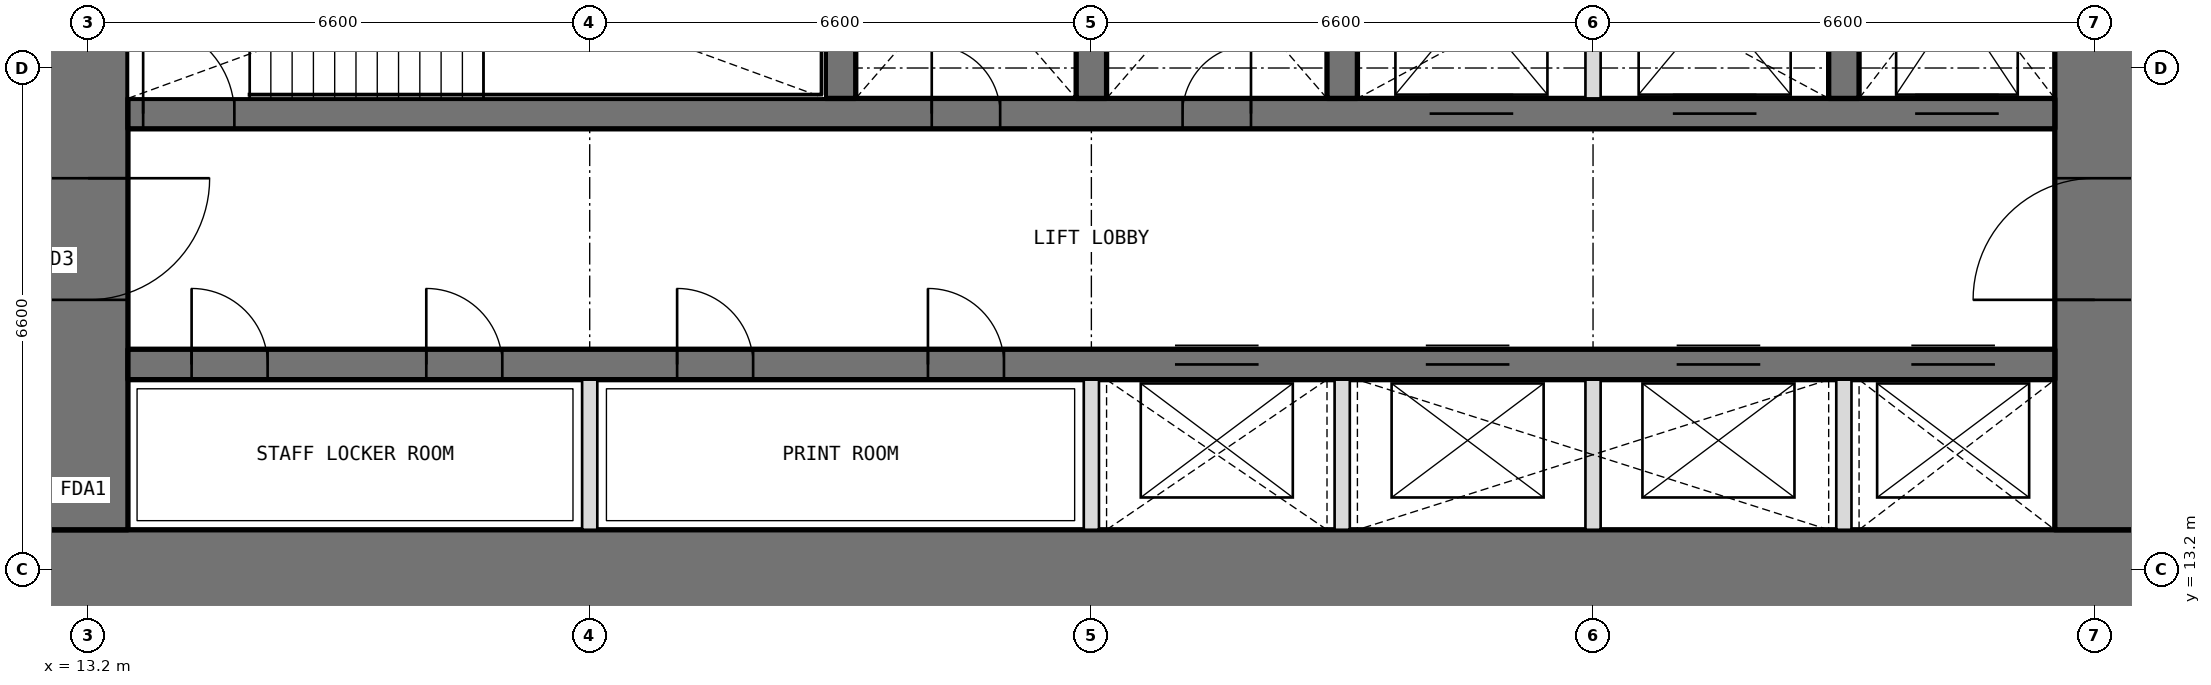
"""IFC4 building model, lengths in metres.
Left out: names, types, materials, properties, quantities, classifications, styles, units other than length and angle.
Written with IfcOpenShell. Run it as: python <this file> out.ifc"""

import sys

from ifc_helpers import new_model, si_unit, direction, frame, frame_2d, origin, place, context, subcontext, project, spatial, rectangle, extrude, element, fill, save


model = new_model("IFC4")
c1 = context("Model", 3, precision=1e-05, world=origin(), true_north=direction((0.0, 1.0)))
c2 = subcontext(c1, "Body", "Model", "MODEL_VIEW")
j1 = project(units=[si_unit("LENGTHUNIT", "METRE"), si_unit("PLANEANGLEUNIT", "RADIAN")], contexts=[c1])
p1 = place(None, origin())
s1 = spatial("IfcSite", under=j1, at=p1, CompositionType="ELEMENT")
p2 = place(p1, origin())
s2 = spatial("IfcBuilding", under=s1, at=p2, CompositionType="ELEMENT")
p3 = place(p2, frame((0.0, 0.0, 111.6)))
s3 = spatial("IfcBuildingStorey", under=s2, at=p3, CompositionType="ELEMENT", Elevation=111.6)
p4 = place(p3, frame((12.675, 13.2, 0.0), z_axis=(0.0, 0.0, 1.0), x_axis=(1.0, 0.0, 0.0)))
e1 = element("IfcWall", 1, at=p4, inside=s3, PredefinedType="SHEAR", context=c2, shape_type="SweptSolid", body=[
    extrude(rectangle(XDim=27.45, YDim=1.05, at=frame_2d((13.725, 0.0))), origin(), (0.0, 0.0, 1.0), 4.2),
])
p5 = place(p3, frame((39.6, 13.725, 0.0), z_axis=(0.0, 0.0, 1.0), x_axis=(0.0, 1.0, 0.0)))
e2 = element("IfcWall", 2, at=p5, inside=s3, PredefinedType="SHEAR", context=c2, shape_type="SweptSolid", body=[
    extrude(rectangle(XDim=18.75, YDim=1.05, at=frame_2d((9.375, 0.0))), origin(), (0.0, 0.0, 1.0), 4.2),
])
p6 = place(p5, frame((3.025, 0.0, 0.0)))
e3 = element("IfcOpeningElement", 3, at=p6, cuts=e2, PredefinedType="OPENING", context=c2, shape_type="SweptSolid", body=[
    extrude(rectangle(XDim=1.6, YDim=2.1, at=frame_2d((0.8, 1.05))), frame((0.0, 0.535, 0.0), z_axis=(0.0, -1.0, 0.0), x_axis=(1.0, 0.0, 0.0)), (0.0, 0.0, 1.0), 1.07),
])
p7 = place(p5, frame((13.825, 0.0, 0.0)))
e4 = element("IfcOpeningElement", 4, at=p7, cuts=e2, PredefinedType="OPENING", context=c2, shape_type="SweptSolid", body=[
    extrude(rectangle(XDim=1.6, YDim=2.1, at=frame_2d((0.8, 1.05))), frame((0.0, 0.535, 0.0), z_axis=(0.0, -1.0, 0.0), x_axis=(1.0, 0.0, 0.0)), (0.0, 0.0, 1.0), 1.07),
])
p8 = place(p3, frame((13.2, 32.475, 0.0), z_axis=(0.0, 0.0, 1.0), x_axis=(0.0, -1.0, 0.0)))
e5 = element("IfcWall", 5, at=p8, inside=s3, PredefinedType="SHEAR", context=c2, shape_type="SweptSolid", body=[
    extrude(rectangle(XDim=18.75, YDim=1.05, at=frame_2d((9.375, 0.0))), origin(), (0.0, 0.0, 1.0), 4.2),
])
p9 = place(p8, frame((14.125, 0.0, 0.0)))
e6 = element("IfcOpeningElement", 6, at=p9, cuts=e5, PredefinedType="OPENING", context=c2, shape_type="SweptSolid", body=[
    extrude(rectangle(XDim=1.6, YDim=2.1, at=frame_2d((0.8, 1.05))), frame((0.0, 0.535, 0.0), z_axis=(0.0, -1.0, 0.0), x_axis=(1.0, 0.0, 0.0)), (0.0, 0.0, 1.0), 1.07),
])
p10 = place(p8, frame((3.325, 0.0, 0.0)))
e7 = element("IfcOpeningElement", 7, at=p10, cuts=e5, PredefinedType="OPENING", context=c2, shape_type="SweptSolid", body=[
    extrude(rectangle(XDim=1.6, YDim=2.1, at=frame_2d((0.8, 1.05))), frame((0.0, 0.535, 0.0), z_axis=(0.0, -1.0, 0.0), x_axis=(1.0, 0.0, 0.0)), (0.0, 0.0, 1.0), 1.07),
])
p11 = place(p3, frame((13.725, 15.9, 0.0), z_axis=(0.0, 0.0, 1.0), x_axis=(1.0, 0.0, 0.0)))
e8 = element("IfcWall", 8, at=p11, inside=s3, PredefinedType="SHEAR", context=c2, shape_type="SweptSolid", body=[
    extrude(rectangle(XDim=25.35, YDim=0.4, at=frame_2d((12.675, 0.0))), origin(), (0.0, 0.0, 1.0), 4.2),
])
p12 = place(p11, frame((0.837, 0.0, 0.0)))
e9 = element("IfcOpeningElement", 9, at=p12, cuts=e8, PredefinedType="OPENING", context=c2, shape_type="SweptSolid", body=[
    extrude(rectangle(XDim=1.0, YDim=2.1, at=frame_2d((0.5, 1.05))), frame((0.0, 0.21, 0.0), z_axis=(0.0, -1.0, 0.0), x_axis=(1.0, 0.0, 0.0)), (0.0, 0.0, 1.0), 0.42),
])
p13 = place(p11, frame((3.925, 0.0, 0.0)))
e10 = element("IfcOpeningElement", 10, at=p13, cuts=e8, PredefinedType="OPENING", context=c2, shape_type="SweptSolid", body=[
    extrude(rectangle(XDim=1.0, YDim=2.1, at=frame_2d((0.5, 1.05))), frame((0.0, 0.21, 0.0), z_axis=(0.0, -1.0, 0.0), x_axis=(1.0, 0.0, 0.0)), (0.0, 0.0, 1.0), 0.42),
])
p14 = place(p11, frame((7.225, 0.0, 0.0)))
e11 = element("IfcOpeningElement", 11, at=p14, cuts=e8, PredefinedType="OPENING", context=c2, shape_type="SweptSolid", body=[
    extrude(rectangle(XDim=1.0, YDim=2.1, at=frame_2d((0.5, 1.05))), frame((0.0, 0.21, 0.0), z_axis=(0.0, -1.0, 0.0), x_axis=(1.0, 0.0, 0.0)), (0.0, 0.0, 1.0), 0.42),
])
p15 = place(p11, frame((10.525, 0.0, 0.0)))
e12 = element("IfcOpeningElement", 12, at=p15, cuts=e8, PredefinedType="OPENING", context=c2, shape_type="SweptSolid", body=[
    extrude(rectangle(XDim=1.0, YDim=2.1, at=frame_2d((0.5, 1.05))), frame((0.0, 0.21, 0.0), z_axis=(0.0, -1.0, 0.0), x_axis=(1.0, 0.0, 0.0)), (0.0, 0.0, 1.0), 0.42),
])
p16 = place(p11, frame((13.775, 0.0, 0.0)))
e13 = element("IfcOpeningElement", 13, at=p16, cuts=e8, PredefinedType="OPENING", context=c2, shape_type="SweptSolid", body=[
    extrude(rectangle(XDim=1.1, YDim=2.1, at=frame_2d((0.55, 1.05))), frame((0.0, 0.21, 0.0), z_axis=(0.0, -1.0, 0.0), x_axis=(1.0, 0.0, 0.0)), (0.0, 0.0, 1.0), 0.42),
])
p17 = place(p11, frame((17.075, 0.0, 0.0)))
e14 = element("IfcOpeningElement", 14, at=p17, cuts=e8, PredefinedType="OPENING", context=c2, shape_type="SweptSolid", body=[
    extrude(rectangle(XDim=1.1, YDim=2.1, at=frame_2d((0.55, 1.05))), frame((0.0, 0.21, 0.0), z_axis=(0.0, -1.0, 0.0), x_axis=(1.0, 0.0, 0.0)), (0.0, 0.0, 1.0), 0.42),
])
p18 = place(p11, frame((20.375, 0.0, 0.0)))
e15 = element("IfcOpeningElement", 15, at=p18, cuts=e8, PredefinedType="OPENING", context=c2, shape_type="SweptSolid", body=[
    extrude(rectangle(XDim=1.1, YDim=2.1, at=frame_2d((0.55, 1.05))), frame((0.0, 0.21, 0.0), z_axis=(0.0, -1.0, 0.0), x_axis=(1.0, 0.0, 0.0)), (0.0, 0.0, 1.0), 0.42),
])
p19 = place(p11, frame((23.462, 0.0, 0.0)))
e16 = element("IfcOpeningElement", 16, at=p19, cuts=e8, PredefinedType="OPENING", context=c2, shape_type="SweptSolid", body=[
    extrude(rectangle(XDim=1.1, YDim=2.1, at=frame_2d((0.55, 1.05))), frame((0.0, 0.21, 0.0), z_axis=(0.0, -1.0, 0.0), x_axis=(1.0, 0.0, 0.0)), (0.0, 0.0, 1.0), 0.42),
])
p20 = place(p3, frame((13.725, 19.2, 0.0), z_axis=(0.0, 0.0, 1.0), x_axis=(1.0, 0.0, 0.0)))
e17 = element("IfcWall", 17, at=p20, inside=s3, PredefinedType="SHEAR", context=c2, shape_type="SweptSolid", body=[
    extrude(rectangle(XDim=25.35, YDim=0.4, at=frame_2d((12.675, 0.0))), origin(), (0.0, 0.0, 1.0), 4.2),
])
p21 = place(p20, frame((10.575, 0.0, 0.0)))
e18 = element("IfcOpeningElement", 18, at=p21, cuts=e17, PredefinedType="OPENING", context=c2, shape_type="SweptSolid", body=[
    extrude(rectangle(XDim=0.9, YDim=2.1, at=frame_2d((0.45, 1.05))), frame((0.0, 0.21, 0.0), z_axis=(0.0, -1.0, 0.0), x_axis=(1.0, 0.0, 0.0)), (0.0, 0.0, 1.0), 0.42),
])
p22 = place(p20, frame((13.875, 0.0, 0.0)))
e19 = element("IfcOpeningElement", 19, at=p22, cuts=e17, PredefinedType="OPENING", context=c2, shape_type="SweptSolid", body=[
    extrude(rectangle(XDim=0.9, YDim=2.1, at=frame_2d((0.45, 1.05))), frame((0.0, 0.21, 0.0), z_axis=(0.0, -1.0, 0.0), x_axis=(1.0, 0.0, 0.0)), (0.0, 0.0, 1.0), 0.42),
])
p23 = place(p20, frame((0.2, 0.0, 0.0)))
e20 = element("IfcOpeningElement", 20, at=p23, cuts=e17, PredefinedType="OPENING", context=c2, shape_type="SweptSolid", body=[
    extrude(rectangle(XDim=1.2, YDim=2.1, at=frame_2d((0.6, 1.05))), frame((0.0, 0.21, 0.0), z_axis=(0.0, -1.0, 0.0), x_axis=(1.0, 0.0, 0.0)), (0.0, 0.0, 1.0), 0.42),
])
p24 = place(p20, frame((23.512, 0.0, 0.0)))
e21 = element("IfcOpeningElement", 21, at=p24, cuts=e17, PredefinedType="OPENING", context=c2, shape_type="SweptSolid", body=[
    extrude(rectangle(XDim=1.1, YDim=2.1, at=frame_2d((0.55, 1.05))), frame((0.0, 0.21, 0.0), z_axis=(0.0, -1.0, 0.0), x_axis=(1.0, 0.0, 0.0)), (0.0, 0.0, 1.0), 0.42),
])
p25 = place(p20, frame((17.125, 0.0, 0.0)))
e22 = element("IfcOpeningElement", 22, at=p25, cuts=e17, PredefinedType="OPENING", context=c2, shape_type="SweptSolid", body=[
    extrude(rectangle(XDim=1.1, YDim=2.1, at=frame_2d((0.55, 1.05))), frame((0.0, 0.21, 0.0), z_axis=(0.0, -1.0, 0.0), x_axis=(1.0, 0.0, 0.0)), (0.0, 0.0, 1.0), 0.42),
])
p26 = place(p20, frame((20.325, 0.0, 0.0)))
e23 = element("IfcOpeningElement", 23, at=p26, cuts=e17, PredefinedType="OPENING", context=c2, shape_type="SweptSolid", body=[
    extrude(rectangle(XDim=1.1, YDim=2.1, at=frame_2d((0.55, 1.05))), frame((0.0, 0.21, 0.0), z_axis=(0.0, -1.0, 0.0), x_axis=(1.0, 0.0, 0.0)), (0.0, 0.0, 1.0), 0.42),
])
for number, where, z_axis, x_axis in (
    (24, (23.1, 19.4, 0.0), (0.0, 0.0, 1.0), (0.0, 1.0, 0.0)),
    (25, (26.4, 19.4, 0.0), (0.0, 0.0, 1.0), (0.0, 1.0, 0.0)),
    (26, (29.7, 19.4, 0.0), (0.0, 0.0, 1.0), (0.0, 1.0, 0.0)),
    (27, (36.3, 19.4, 0.0), (0.0, 0.0, 1.0), (0.0, 1.0, 0.0)),
):
    element("IfcWall", number, at=place(p3, frame(where, z_axis=z_axis, x_axis=x_axis)), inside=s3, PredefinedType="SHEAR", context=c2, shape_type="SweptSolid", body=[
        extrude(rectangle(XDim=3.35, YDim=0.4, at=frame_2d((1.675, 0.0))), origin(), (0.0, 0.0, 1.0), 4.2),
    ])
for number, where, z_axis, x_axis in (
    (28, (19.8, 13.725, 0.0), (0.0, 0.0, 1.0), (0.0, 1.0, 0.0)),
    (29, (26.4, 13.725, 0.0), (0.0, 0.0, 1.0), (0.0, 1.0, 0.0)),
    (30, (29.7, 13.725, 0.0), (0.0, 0.0, 1.0), (0.0, 1.0, 0.0)),
    (31, (33.0, 13.725, 0.0), (0.0, 0.0, 1.0), (0.0, 1.0, 0.0)),
    (32, (36.3, 13.725, 0.0), (0.0, 0.0, 1.0), (0.0, 1.0, 0.0)),
):
    element("IfcWall", number, at=place(p3, frame(where, z_axis=z_axis, x_axis=x_axis)), inside=s3, PredefinedType="PARTITIONING", context=c2, shape_type="SweptSolid", body=[
        extrude(rectangle(XDim=1.975, YDim=0.2, at=frame_2d((0.987, 0.0))), origin(), (0.0, 0.0, 1.0), 4.2),
    ])
p27 = place(p3, frame((33.0, 19.4, 0.0), z_axis=(0.0, 0.0, 1.0), x_axis=(0.0, 1.0, 0.0)))
e33 = element("IfcWall", 33, at=p27, inside=s3, PredefinedType="PARTITIONING", context=c2, shape_type="SweptSolid", body=[
    extrude(rectangle(XDim=3.35, YDim=0.2, at=frame_2d((1.675, 0.0))), origin(), (0.0, 0.0, 1.0), 4.2),
])
p28 = place(p21, origin())
e34 = element("IfcDoor", 34, at=p28, inside=s3, OperationType="SINGLE_SWING_LEFT", PredefinedType="DOOR", context=c2, shape_type="SweptSolid", body=[
    extrude(rectangle(XDim=0.9, YDim=2.1, at=frame_2d((0.45, 1.05))), frame((0.0, 0.025, 0.0), z_axis=(0.0, -1.0, 0.0), x_axis=(1.0, 0.0, 0.0)), (0.0, 0.0, 1.0), 0.05),
])
fill(e18, e34)
p29 = place(p22, origin())
e35 = element("IfcDoor", 35, at=p29, inside=s3, OperationType="SINGLE_SWING_RIGHT", PredefinedType="DOOR", context=c2, shape_type="SweptSolid", body=[
    extrude(rectangle(XDim=0.9, YDim=2.1, at=frame_2d((0.45, 1.05))), frame((0.0, 0.025, 0.0), z_axis=(0.0, -1.0, 0.0), x_axis=(1.0, 0.0, 0.0)), (0.0, 0.0, 1.0), 0.05),
])
fill(e19, e35)
p30 = place(p12, origin())
e36 = element("IfcDoor", 36, at=p30, inside=s3, OperationType="SINGLE_SWING_LEFT", PredefinedType="DOOR", context=c2, shape_type="SweptSolid", body=[
    extrude(rectangle(XDim=1.0, YDim=2.1, at=frame_2d((0.5, 1.05))), frame((0.0, 0.025, 0.0), z_axis=(0.0, -1.0, 0.0), x_axis=(1.0, 0.0, 0.0)), (0.0, 0.0, 1.0), 0.05),
])
fill(e9, e36)
p31 = place(p13, origin())
e37 = element("IfcDoor", 37, at=p31, inside=s3, OperationType="SINGLE_SWING_LEFT", PredefinedType="DOOR", context=c2, shape_type="SweptSolid", body=[
    extrude(rectangle(XDim=1.0, YDim=2.1, at=frame_2d((0.5, 1.05))), frame((0.0, 0.025, 0.0), z_axis=(0.0, -1.0, 0.0), x_axis=(1.0, 0.0, 0.0)), (0.0, 0.0, 1.0), 0.05),
])
fill(e10, e37)
p32 = place(p14, origin())
e38 = element("IfcDoor", 38, at=p32, inside=s3, OperationType="SINGLE_SWING_LEFT", PredefinedType="DOOR", context=c2, shape_type="SweptSolid", body=[
    extrude(rectangle(XDim=1.0, YDim=2.1, at=frame_2d((0.5, 1.05))), frame((0.0, 0.025, 0.0), z_axis=(0.0, -1.0, 0.0), x_axis=(1.0, 0.0, 0.0)), (0.0, 0.0, 1.0), 0.05),
])
fill(e11, e38)
p33 = place(p15, origin())
e39 = element("IfcDoor", 39, at=p33, inside=s3, OperationType="SINGLE_SWING_LEFT", PredefinedType="DOOR", context=c2, shape_type="SweptSolid", body=[
    extrude(rectangle(XDim=1.0, YDim=2.1, at=frame_2d((0.5, 1.05))), frame((0.0, 0.025, 0.0), z_axis=(0.0, -1.0, 0.0), x_axis=(1.0, 0.0, 0.0)), (0.0, 0.0, 1.0), 0.05),
])
fill(e12, e39)
p34 = place(p23, origin())
e40 = element("IfcDoor", 40, at=p34, inside=s3, OperationType="SINGLE_SWING_LEFT", PredefinedType="DOOR", context=c2, shape_type="SweptSolid", body=[
    extrude(rectangle(XDim=1.2, YDim=2.1, at=frame_2d((0.6, 1.05))), frame((0.0, 0.025, 0.0), z_axis=(0.0, -1.0, 0.0), x_axis=(1.0, 0.0, 0.0)), (0.0, 0.0, 1.0), 0.05),
])
fill(e20, e40)
p35 = place(p9, origin())
e41 = element("IfcDoor", 41, at=p35, inside=s3, OperationType="DOUBLE_DOOR_DOUBLE_SWING", PredefinedType="DOOR", context=c2, shape_type="SweptSolid", body=[
    extrude(rectangle(XDim=1.6, YDim=2.1, at=frame_2d((0.8, 1.05))), frame((0.0, 0.025, 0.0), z_axis=(0.0, -1.0, 0.0), x_axis=(1.0, 0.0, 0.0)), (0.0, 0.0, 1.0), 0.05),
])
fill(e6, e41)
p36 = place(p6, origin())
e42 = element("IfcDoor", 42, at=p36, inside=s3, OperationType="DOUBLE_DOOR_DOUBLE_SWING", PredefinedType="DOOR", context=c2, shape_type="SweptSolid", body=[
    extrude(rectangle(XDim=1.6, YDim=2.1, at=frame_2d((0.8, 1.05))), frame((0.0, 0.025, 0.0), z_axis=(0.0, -1.0, 0.0), x_axis=(1.0, 0.0, 0.0)), (0.0, 0.0, 1.0), 0.05),
])
fill(e3, e42)
p37 = place(p16, origin())
e43 = element("IfcDoor", 43, at=p37, inside=s3, OperationType="DOUBLE_DOOR_SLIDING", PredefinedType="DOOR", context=c2, shape_type="SweptSolid", body=[
    extrude(rectangle(XDim=1.1, YDim=2.1, at=frame_2d((0.55, 1.05))), frame((0.0, 0.025, 0.0), z_axis=(0.0, -1.0, 0.0), x_axis=(1.0, 0.0, 0.0)), (0.0, 0.0, 1.0), 0.05),
])
fill(e13, e43)
p38 = place(p17, origin())
e44 = element("IfcDoor", 44, at=p38, inside=s3, OperationType="DOUBLE_DOOR_SLIDING", PredefinedType="DOOR", context=c2, shape_type="SweptSolid", body=[
    extrude(rectangle(XDim=1.1, YDim=2.1, at=frame_2d((0.55, 1.05))), frame((0.0, 0.025, 0.0), z_axis=(0.0, -1.0, 0.0), x_axis=(1.0, 0.0, 0.0)), (0.0, 0.0, 1.0), 0.05),
])
fill(e14, e44)
p39 = place(p18, origin())
e45 = element("IfcDoor", 45, at=p39, inside=s3, OperationType="DOUBLE_DOOR_SLIDING", PredefinedType="DOOR", context=c2, shape_type="SweptSolid", body=[
    extrude(rectangle(XDim=1.1, YDim=2.1, at=frame_2d((0.55, 1.05))), frame((0.0, 0.025, 0.0), z_axis=(0.0, -1.0, 0.0), x_axis=(1.0, 0.0, 0.0)), (0.0, 0.0, 1.0), 0.05),
])
fill(e15, e45)
p40 = place(p19, origin())
e46 = element("IfcDoor", 46, at=p40, inside=s3, OperationType="DOUBLE_DOOR_SLIDING", PredefinedType="DOOR", context=c2, shape_type="SweptSolid", body=[
    extrude(rectangle(XDim=1.1, YDim=2.1, at=frame_2d((0.55, 1.05))), frame((0.0, 0.025, 0.0), z_axis=(0.0, -1.0, 0.0), x_axis=(1.0, 0.0, 0.0)), (0.0, 0.0, 1.0), 0.05),
])
fill(e16, e46)
p41 = place(p24, origin())
e47 = element("IfcDoor", 47, at=p41, inside=s3, OperationType="DOUBLE_DOOR_SLIDING", PredefinedType="DOOR", context=c2, shape_type="SweptSolid", body=[
    extrude(rectangle(XDim=1.1, YDim=2.1, at=frame_2d((0.55, 1.05))), frame((0.0, 0.025, 0.0), z_axis=(0.0, -1.0, 0.0), x_axis=(1.0, 0.0, 0.0)), (0.0, 0.0, 1.0), 0.05),
])
fill(e21, e47)
p42 = place(p25, origin())
e48 = element("IfcDoor", 48, at=p42, inside=s3, OperationType="DOUBLE_DOOR_SLIDING", PredefinedType="DOOR", context=c2, shape_type="SweptSolid", body=[
    extrude(rectangle(XDim=1.1, YDim=2.1, at=frame_2d((0.55, 1.05))), frame((0.0, 0.025, 0.0), z_axis=(0.0, -1.0, 0.0), x_axis=(1.0, 0.0, 0.0)), (0.0, 0.0, 1.0), 0.05),
])
fill(e22, e48)
p43 = place(p26, origin())
e49 = element("IfcDoor", 49, at=p43, inside=s3, OperationType="DOUBLE_DOOR_SLIDING", PredefinedType="DOOR", context=c2, shape_type="SweptSolid", body=[
    extrude(rectangle(XDim=1.1, YDim=2.1, at=frame_2d((0.55, 1.05))), frame((0.0, 0.025, 0.0), z_axis=(0.0, -1.0, 0.0), x_axis=(1.0, 0.0, 0.0)), (0.0, 0.0, 1.0), 0.05),
])
fill(e23, e49)
save(model, sys.argv[1])
